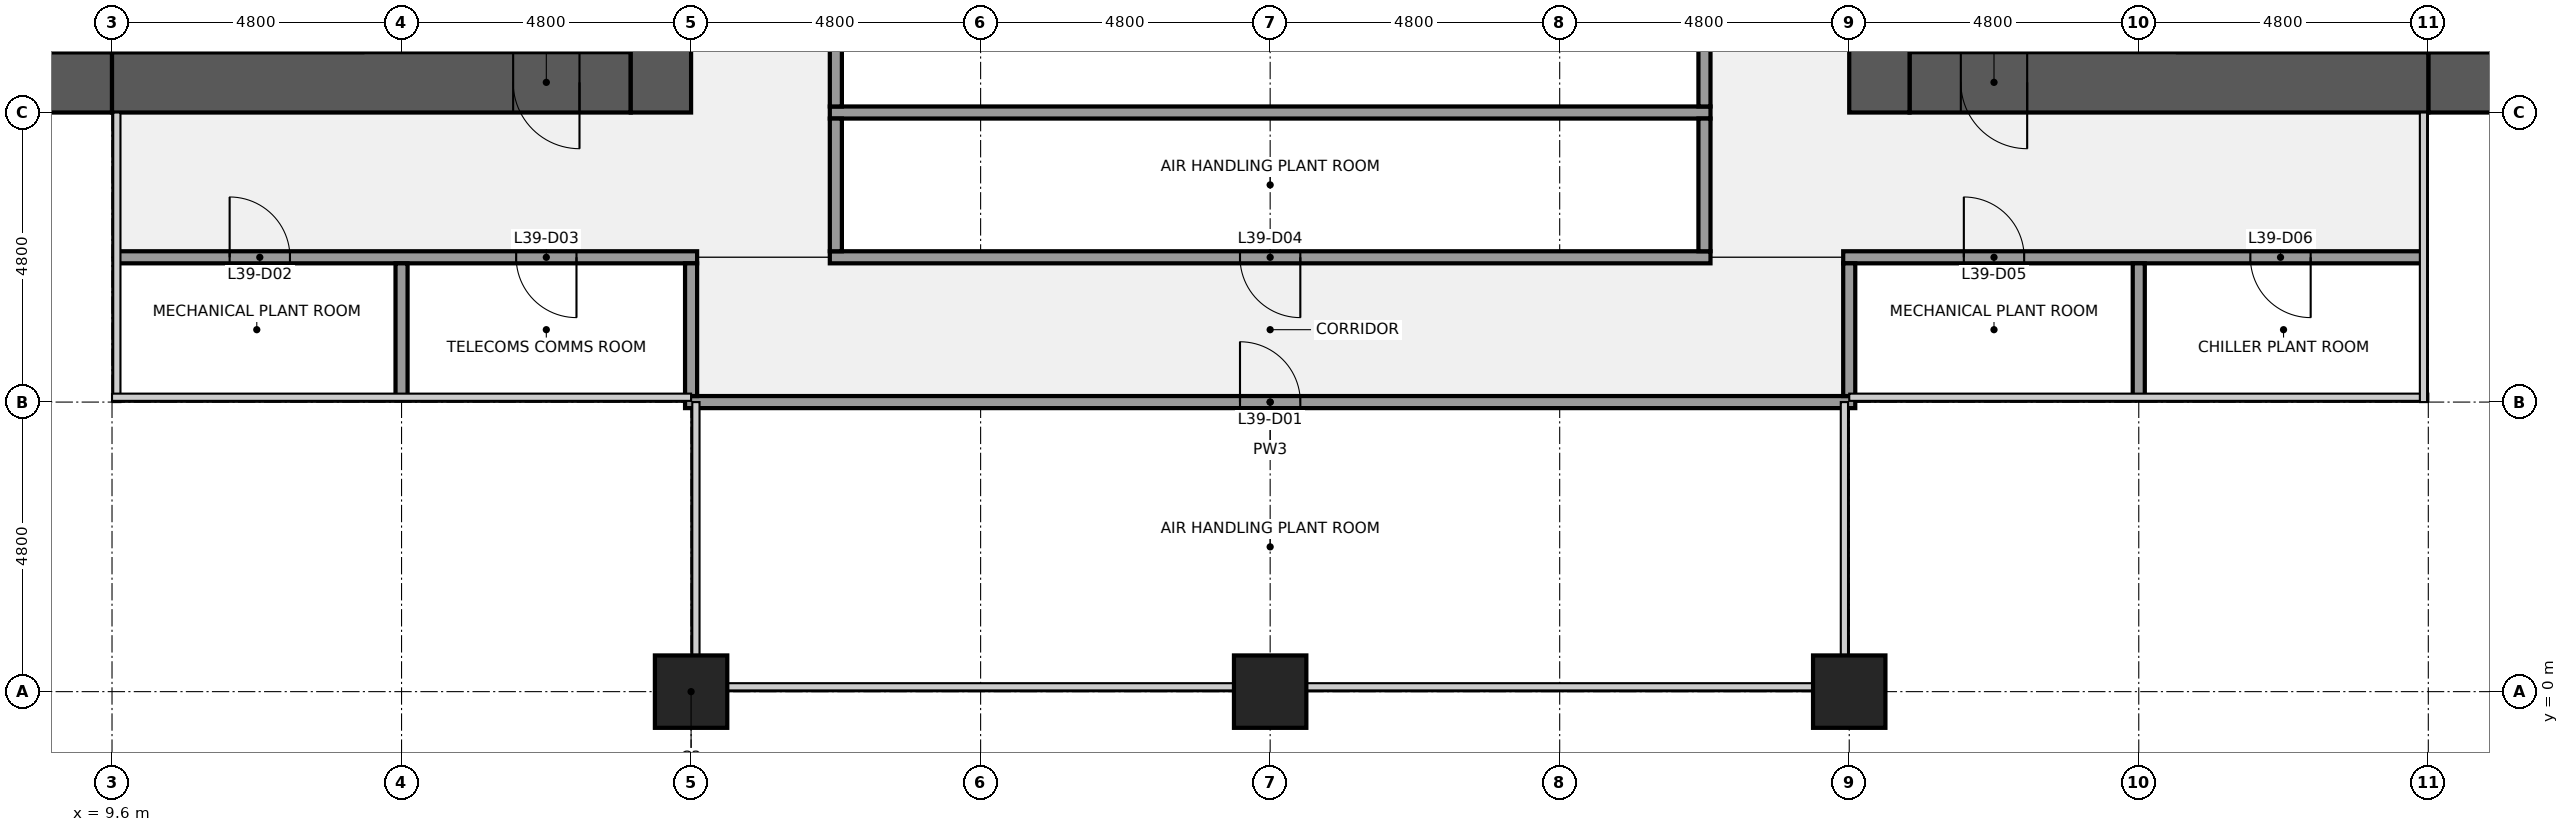
"""IFC4 building model, lengths in metres.
Left out: names, types, materials, properties, quantities, classifications, styles, units other than length and angle.
Written with IfcOpenShell. Run it as: python <this file> out.ifc"""

import sys

from ifc_helpers import new_model, si_unit, direction, frame, frame_2d, origin, origin_2d, place, context, subcontext, project, spatial, rectangle, extrude, element, fill, save


model = new_model("IFC4")
c1 = context("Model", 3, precision=1e-05, world=origin(), true_north=direction((0.0, 1.0)))
c2 = subcontext(c1, "Body", "Model", "MODEL_VIEW")
j1 = project(units=[si_unit("LENGTHUNIT", "METRE"), si_unit("PLANEANGLEUNIT", "RADIAN")], contexts=[c1])
p1 = place(None, origin())
s1 = spatial("IfcSite", under=j1, at=p1, CompositionType="ELEMENT")
p2 = place(p1, origin())
s2 = spatial("IfcBuilding", under=s1, at=p2, CompositionType="ELEMENT")
p3 = place(p2, frame((0.0, 0.0, 176.1)))
s3 = spatial("IfcBuildingStorey", under=s2, at=p3, CompositionType="ELEMENT", Elevation=176.1)
for number, where, z_axis, x_axis in (
    (1, (19.2, 0.0, 0.0), (0.0, 0.0, 1.0), (1.0, 0.0, 0.0)),
    (2, (28.8, 0.0, 0.0), (0.0, 0.0, 1.0), (1.0, 0.0, 0.0)),
    (3, (38.4, 0.0, 0.0), (0.0, 0.0, 1.0), (1.0, 0.0, 0.0)),
):
    element("IfcColumn", number, at=place(p3, frame(where, z_axis=z_axis, x_axis=x_axis)), inside=s3, PredefinedType="COLUMN", context=c2, shape_type="SweptSolid", body=[
        extrude(rectangle(XDim=1.2, YDim=1.2, at=origin_2d()), origin(), (0.0, 0.0, 1.0), 4.5),
    ])
p4 = place(p3, frame((9.6, 10.1, 0.0), z_axis=(0.0, 0.0, 1.0), x_axis=(-1.0, 0.0, 0.0)))
e4 = element("IfcWall", 4, at=p4, inside=s3, PredefinedType="SHEAR", context=c2, shape_type="SweptSolid", body=[
    extrude(rectangle(XDim=8.6, YDim=1.0, at=frame_2d((4.3, 0.0))), origin(), (0.0, 0.0, 1.0), 4.1),
])
p5 = place(p4, frame((1.5, 0.0, 0.9)))
e5 = element("IfcOpeningElement", 5, at=p5, cuts=e4, PredefinedType="OPENING", context=c2, shape_type="SweptSolid", body=[
    extrude(rectangle(XDim=1.8, YDim=1.5, at=frame_2d((0.9, 0.75))), frame((0.0, 0.51, 0.0), z_axis=(0.0, -1.0, 0.0), x_axis=(1.0, 0.0, 0.0)), (0.0, 0.0, 1.0), 1.02),
])
p6 = place(p3, frame((18.2, 10.1, 0.0), z_axis=(0.0, 0.0, 1.0), x_axis=(-1.0, 0.0, 0.0)))
e6 = element("IfcWall", 6, at=p6, inside=s3, PredefinedType="SHEAR", context=c2, shape_type="SweptSolid", body=[
    extrude(rectangle(XDim=8.6, YDim=1.0, at=frame_2d((4.3, 0.0))), origin(), (0.0, 0.0, 1.0), 4.1),
])
p7 = place(p6, frame((0.85, 0.0, 0.0)))
e7 = element("IfcOpeningElement", 7, at=p7, cuts=e6, PredefinedType="OPENING", context=c2, shape_type="SweptSolid", body=[
    extrude(rectangle(XDim=1.1, YDim=2.1, at=frame_2d((0.55, 1.05))), frame((0.0, 0.51, 0.0), z_axis=(0.0, -1.0, 0.0), x_axis=(1.0, 0.0, 0.0)), (0.0, 0.0, 1.0), 1.02),
])
p8 = place(p3, frame((18.7, 38.4, 0.0), z_axis=(0.0, 0.0, 1.0), x_axis=(0.0, -1.0, 0.0)))
e8 = element("IfcWall", 8, at=p8, inside=s3, PredefinedType="SHEAR", context=c2, shape_type="SweptSolid", body=[
    extrude(rectangle(XDim=28.8, YDim=1.0, at=frame_2d((14.4, 0.0))), origin(), (0.0, 0.0, 1.0), 4.1),
])
p9 = place(p8, frame((18.3, 0.0, 0.0)))
e9 = element("IfcOpeningElement", 9, at=p9, cuts=e8, PredefinedType="OPENING", context=c2, shape_type="SweptSolid", body=[
    extrude(rectangle(XDim=1.8, YDim=2.1, at=frame_2d((0.9, 1.05))), frame((0.0, 0.51, 0.0), z_axis=(0.0, -1.0, 0.0), x_axis=(1.0, 0.0, 0.0)), (0.0, 0.0, 1.0), 1.02),
])
p10 = place(p8, frame((8.7, 0.0, 0.0)))
e10 = element("IfcOpeningElement", 10, at=p10, cuts=e8, PredefinedType="OPENING", context=c2, shape_type="SweptSolid", body=[
    extrude(rectangle(XDim=1.8, YDim=2.1, at=frame_2d((0.9, 1.05))), frame((0.0, 0.51, 0.0), z_axis=(0.0, -1.0, 0.0), x_axis=(1.0, 0.0, 0.0)), (0.0, 0.0, 1.0), 1.02),
])
p11 = place(p3, frame((6.25, 10.7, 0.0), z_axis=(0.0, 0.0, 1.0), x_axis=(1.0, 0.0, 0.0)))
e11 = element("IfcWall", 11, at=p11, inside=s3, PredefinedType="SHEAR", context=c2, shape_type="SweptSolid", body=[
    extrude(rectangle(XDim=3.35, YDim=0.2, at=frame_2d((1.675, 0.0))), origin(), (0.0, 0.0, 1.0), 4.1),
])
p12 = place(p3, frame((9.6, 10.7, 0.0), z_axis=(0.0, 0.0, 1.0), x_axis=(1.0, 0.0, 0.0)))
e12 = element("IfcWall", 12, at=p12, inside=s3, PredefinedType="SHEAR", context=c2, shape_type="SweptSolid", body=[
    extrude(rectangle(XDim=4.15, YDim=0.2, at=frame_2d((2.075, 0.0))), origin(), (0.0, 0.0, 1.0), 4.1),
])
p13 = place(p3, frame((56.6, 10.1, 0.0), z_axis=(0.0, 0.0, 1.0), x_axis=(-1.0, 0.0, 0.0)))
e13 = element("IfcWall", 13, at=p13, inside=s3, PredefinedType="SHEAR", context=c2, shape_type="SweptSolid", body=[
    extrude(rectangle(XDim=8.6, YDim=1.0, at=frame_2d((4.3, 0.0))), origin(), (0.0, 0.0, 1.0), 4.1),
])
p14 = place(p13, frame((5.3, 0.0, 0.9)))
e14 = element("IfcOpeningElement", 14, at=p14, cuts=e13, PredefinedType="OPENING", context=c2, shape_type="SweptSolid", body=[
    extrude(rectangle(XDim=1.8, YDim=1.5, at=frame_2d((0.9, 0.75))), frame((0.0, 0.51, 0.0), z_axis=(0.0, -1.0, 0.0), x_axis=(1.0, 0.0, 0.0)), (0.0, 0.0, 1.0), 1.02),
])
p15 = place(p3, frame((48.0, 10.1, 0.0), z_axis=(0.0, 0.0, 1.0), x_axis=(-1.0, 0.0, 0.0)))
e15 = element("IfcWall", 15, at=p15, inside=s3, PredefinedType="SHEAR", context=c2, shape_type="SweptSolid", body=[
    extrude(rectangle(XDim=8.6, YDim=1.0, at=frame_2d((4.3, 0.0))), origin(), (0.0, 0.0, 1.0), 4.1),
])
p16 = place(p15, frame((6.65, 0.0, 0.0)))
e16 = element("IfcOpeningElement", 16, at=p16, cuts=e15, PredefinedType="OPENING", context=c2, shape_type="SweptSolid", body=[
    extrude(rectangle(XDim=1.1, YDim=2.1, at=frame_2d((0.55, 1.05))), frame((0.0, 0.51, 0.0), z_axis=(0.0, -1.0, 0.0), x_axis=(1.0, 0.0, 0.0)), (0.0, 0.0, 1.0), 1.02),
])
p17 = place(p3, frame((38.9, 9.6, 0.0), z_axis=(0.0, 0.0, 1.0), x_axis=(0.0, 1.0, 0.0)))
e17 = element("IfcWall", 17, at=p17, inside=s3, PredefinedType="SHEAR", context=c2, shape_type="SweptSolid", body=[
    extrude(rectangle(XDim=28.8, YDim=1.0, at=frame_2d((14.4, 0.0))), origin(), (0.0, 0.0, 1.0), 4.1),
])
p18 = place(p17, frame((8.7, 0.0, 0.0)))
e18 = element("IfcOpeningElement", 18, at=p18, cuts=e17, PredefinedType="OPENING", context=c2, shape_type="SweptSolid", body=[
    extrude(rectangle(XDim=1.8, YDim=2.1, at=frame_2d((0.9, 1.05))), frame((0.0, 0.51, 0.0), z_axis=(0.0, -1.0, 0.0), x_axis=(1.0, 0.0, 0.0)), (0.0, 0.0, 1.0), 1.02),
])
p19 = place(p17, frame((18.3, 0.0, 0.0)))
e19 = element("IfcOpeningElement", 19, at=p19, cuts=e17, PredefinedType="OPENING", context=c2, shape_type="SweptSolid", body=[
    extrude(rectangle(XDim=1.8, YDim=2.1, at=frame_2d((0.9, 1.05))), frame((0.0, 0.51, 0.0), z_axis=(0.0, -1.0, 0.0), x_axis=(1.0, 0.0, 0.0)), (0.0, 0.0, 1.0), 1.02),
])
p20 = place(p3, frame((48.0, 10.7, 0.0), z_axis=(0.0, 0.0, 1.0), x_axis=(1.0, 0.0, 0.0)))
e20 = element("IfcWall", 20, at=p20, inside=s3, PredefinedType="SHEAR", context=c2, shape_type="SweptSolid", body=[
    extrude(rectangle(XDim=3.35, YDim=0.2, at=frame_2d((1.675, 0.0))), origin(), (0.0, 0.0, 1.0), 4.1),
])
p21 = place(p3, frame((43.85, 10.7, 0.0), z_axis=(0.0, 0.0, 1.0), x_axis=(1.0, 0.0, 0.0)))
e21 = element("IfcWall", 21, at=p21, inside=s3, PredefinedType="SHEAR", context=c2, shape_type="SweptSolid", body=[
    extrude(rectangle(XDim=4.15, YDim=0.2, at=frame_2d((2.075, 0.0))), origin(), (0.0, 0.0, 1.0), 4.1),
])
p22 = place(p3, frame((19.1, 4.8, 0.0), z_axis=(0.0, 0.0, 1.0), x_axis=(1.0, 0.0, 0.0)))
e22 = element("IfcWall", 22, at=p22, inside=s3, PredefinedType="PARTITIONING", context=c2, shape_type="SweptSolid", body=[
    extrude(rectangle(XDim=19.4, YDim=0.2, at=frame_2d((9.7, 0.0))), origin(), (0.0, 0.0, 1.0), 2.992),
])
p23 = place(p22, frame((9.2, 0.0, 0.0)))
e23 = element("IfcOpeningElement", 23, at=p23, cuts=e22, PredefinedType="OPENING", context=c2, shape_type="SweptSolid", body=[
    extrude(rectangle(XDim=1.0, YDim=2.1, at=frame_2d((0.5, 1.05))), frame((0.0, 0.11, 0.0), z_axis=(0.0, -1.0, 0.0), x_axis=(1.0, 0.0, 0.0)), (0.0, 0.0, 1.0), 0.22),
])
p24 = place(p3, frame((9.7, 7.2, 0.0), z_axis=(0.0, 0.0, 1.0), x_axis=(1.0, 0.0, 0.0)))
e24 = element("IfcWall", 24, at=p24, inside=s3, PredefinedType="PARTITIONING", context=c2, shape_type="SweptSolid", body=[
    extrude(rectangle(XDim=9.6, YDim=0.2, at=frame_2d((4.8, 0.0))), origin(), (0.0, 0.0, 1.0), 2.992),
])
p25 = place(p24, frame((1.85, 0.0, 0.0)))
e25 = element("IfcOpeningElement", 25, at=p25, cuts=e24, PredefinedType="OPENING", context=c2, shape_type="SweptSolid", body=[
    extrude(rectangle(XDim=1.0, YDim=2.1, at=frame_2d((0.5, 1.05))), frame((0.0, 0.11, 0.0), z_axis=(0.0, -1.0, 0.0), x_axis=(1.0, 0.0, 0.0)), (0.0, 0.0, 1.0), 0.22),
])
p26 = place(p24, frame((6.6, 0.0, 0.0)))
e26 = element("IfcOpeningElement", 26, at=p26, cuts=e24, PredefinedType="OPENING", context=c2, shape_type="SweptSolid", body=[
    extrude(rectangle(XDim=1.0, YDim=2.1, at=frame_2d((0.5, 1.05))), frame((0.0, 0.11, 0.0), z_axis=(0.0, -1.0, 0.0), x_axis=(1.0, 0.0, 0.0)), (0.0, 0.0, 1.0), 0.22),
])
p27 = place(p3, frame((21.5, 7.2, 0.0), z_axis=(0.0, 0.0, 1.0), x_axis=(1.0, 0.0, 0.0)))
e27 = element("IfcWall", 27, at=p27, inside=s3, PredefinedType="PARTITIONING", context=c2, shape_type="SweptSolid", body=[
    extrude(rectangle(XDim=14.6, YDim=0.2, at=frame_2d((7.3, 0.0))), origin(), (0.0, 0.0, 1.0), 2.992),
])
p28 = place(p27, frame((6.8, 0.0, 0.0)))
e28 = element("IfcOpeningElement", 28, at=p28, cuts=e27, PredefinedType="OPENING", context=c2, shape_type="SweptSolid", body=[
    extrude(rectangle(XDim=1.0, YDim=2.1, at=frame_2d((0.5, 1.05))), frame((0.0, 0.11, 0.0), z_axis=(0.0, -1.0, 0.0), x_axis=(1.0, 0.0, 0.0)), (0.0, 0.0, 1.0), 0.22),
])
p29 = place(p3, frame((38.3, 7.2, 0.0), z_axis=(0.0, 0.0, 1.0), x_axis=(1.0, 0.0, 0.0)))
e29 = element("IfcWall", 29, at=p29, inside=s3, PredefinedType="PARTITIONING", context=c2, shape_type="SweptSolid", body=[
    extrude(rectangle(XDim=9.6, YDim=0.2, at=frame_2d((4.8, 0.0))), origin(), (0.0, 0.0, 1.0), 2.992),
])
p30 = place(p29, frame((2.0, 0.0, 0.0)))
e30 = element("IfcOpeningElement", 30, at=p30, cuts=e29, PredefinedType="OPENING", context=c2, shape_type="SweptSolid", body=[
    extrude(rectangle(XDim=1.0, YDim=2.1, at=frame_2d((0.5, 1.05))), frame((0.0, 0.11, 0.0), z_axis=(0.0, -1.0, 0.0), x_axis=(1.0, 0.0, 0.0)), (0.0, 0.0, 1.0), 0.22),
])
p31 = place(p29, frame((6.75, 0.0, 0.0)))
e31 = element("IfcOpeningElement", 31, at=p31, cuts=e29, PredefinedType="OPENING", context=c2, shape_type="SweptSolid", body=[
    extrude(rectangle(XDim=1.0, YDim=2.1, at=frame_2d((0.5, 1.05))), frame((0.0, 0.11, 0.0), z_axis=(0.0, -1.0, 0.0), x_axis=(1.0, 0.0, 0.0)), (0.0, 0.0, 1.0), 0.22),
])
p32 = place(p3, frame((21.5, 9.6, 0.0), z_axis=(0.0, 0.0, 1.0), x_axis=(1.0, 0.0, 0.0)))
e32 = element("IfcWall", 32, at=p32, inside=s3, PredefinedType="PARTITIONING", context=c2, shape_type="SweptSolid", body=[
    extrude(rectangle(XDim=14.6, YDim=0.2, at=frame_2d((7.3, 0.0))), origin(), (0.0, 0.0, 1.0), 2.992),
])
for number, where, z_axis, x_axis in (
    (33, (14.4, 4.9, 0.0), (0.0, 0.0, 1.0), (0.0, 1.0, 0.0)),
    (34, (19.2, 4.9, 0.0), (0.0, 0.0, 1.0), (0.0, 1.0, 0.0)),
):
    element("IfcWall", number, at=place(p3, frame(where, z_axis=z_axis, x_axis=x_axis)), inside=s3, PredefinedType="PARTITIONING", context=c2, shape_type="SweptSolid", body=[
        extrude(rectangle(XDim=2.2, YDim=0.2, at=frame_2d((1.1, 0.0))), origin(), (0.0, 0.0, 1.0), 2.992),
    ])
p33 = place(p3, frame((21.6, 7.3, 0.0), z_axis=(0.0, 0.0, 1.0), x_axis=(0.0, 1.0, 0.0)))
e35 = element("IfcWall", 35, at=p33, inside=s3, PredefinedType="PARTITIONING", context=c2, shape_type="SweptSolid", body=[
    extrude(rectangle(XDim=2.2, YDim=0.2, at=frame_2d((1.1, 0.0))), origin(), (0.0, 0.0, 1.0), 2.992),
])
p34 = place(p3, frame((21.6, 9.7, 0.0), z_axis=(0.0, 0.0, 1.0), x_axis=(0.0, 1.0, 0.0)))
e36 = element("IfcWall", 36, at=p34, inside=s3, PredefinedType="PARTITIONING", context=c2, shape_type="SweptSolid", body=[
    extrude(rectangle(XDim=9.4, YDim=0.2, at=frame_2d((4.7, 0.0))), origin(), (0.0, 0.0, 1.0), 2.992),
])
p35 = place(p34, frame((4.2, 0.0, 0.0)))
e37 = element("IfcOpeningElement", 37, at=p35, cuts=e36, PredefinedType="OPENING", context=c2, shape_type="SweptSolid", body=[
    extrude(rectangle(XDim=1.0, YDim=2.1, at=frame_2d((0.5, 1.05))), frame((0.0, 0.11, 0.0), z_axis=(0.0, -1.0, 0.0), x_axis=(1.0, 0.0, 0.0)), (0.0, 0.0, 1.0), 0.22),
])
p36 = place(p3, frame((36.0, 7.3, 0.0), z_axis=(0.0, 0.0, 1.0), x_axis=(0.0, 1.0, 0.0)))
e38 = element("IfcWall", 38, at=p36, inside=s3, PredefinedType="PARTITIONING", context=c2, shape_type="SweptSolid", body=[
    extrude(rectangle(XDim=2.2, YDim=0.2, at=frame_2d((1.1, 0.0))), origin(), (0.0, 0.0, 1.0), 2.992),
])
p37 = place(p3, frame((36.0, 9.7, 0.0), z_axis=(0.0, 0.0, 1.0), x_axis=(0.0, 1.0, 0.0)))
e39 = element("IfcWall", 39, at=p37, inside=s3, PredefinedType="PARTITIONING", context=c2, shape_type="SweptSolid", body=[
    extrude(rectangle(XDim=9.4, YDim=0.2, at=frame_2d((4.7, 0.0))), origin(), (0.0, 0.0, 1.0), 2.992),
])
for number, where, z_axis, x_axis in (
    (40, (38.4, 4.9, 0.0), (0.0, 0.0, 1.0), (0.0, 1.0, 0.0)),
    (41, (43.2, 4.9, 0.0), (0.0, 0.0, 1.0), (0.0, 1.0, 0.0)),
):
    element("IfcWall", number, at=place(p3, frame(where, z_axis=z_axis, x_axis=x_axis)), inside=s3, PredefinedType="PARTITIONING", context=c2, shape_type="SweptSolid", body=[
        extrude(rectangle(XDim=2.2, YDim=0.2, at=frame_2d((1.1, 0.0))), origin(), (0.0, 0.0, 1.0), 2.992),
    ])
for number, where, z_axis, x_axis in (
    (42, (19.2, -1.05, 0.0), (0.0, 0.0, 1.0), (1.0, 0.0, 0.0)),
    (43, (38.4, -1.05, 0.0), (0.0, 0.0, 1.0), (1.0, 0.0, 0.0)),
):
    element("IfcColumn", number, at=place(p3, frame(where, z_axis=z_axis, x_axis=x_axis)), inside=s3, PredefinedType="PILASTER", context=c2, shape_type="SweptSolid", body=[
        extrude(rectangle(XDim=3.6, YDim=0.9, at=origin_2d()), origin(), (0.0, 0.0, 1.0), 4.5),
    ])
p38 = place(p7, origin())
e44 = element("IfcDoor", 44, at=p38, inside=s3, OperationType="SINGLE_SWING_LEFT", PredefinedType="DOOR", context=c2, shape_type="SweptSolid", body=[
    extrude(rectangle(XDim=1.1, YDim=2.1, at=frame_2d((0.55, 1.05))), frame((0.0, 0.025, 0.0), z_axis=(0.0, -1.0, 0.0), x_axis=(1.0, 0.0, 0.0)), (0.0, 0.0, 1.0), 0.05),
])
fill(e7, e44)
p39 = place(p16, origin())
e45 = element("IfcDoor", 45, at=p39, inside=s3, OperationType="SINGLE_SWING_LEFT", PredefinedType="DOOR", context=c2, shape_type="SweptSolid", body=[
    extrude(rectangle(XDim=1.1, YDim=2.1, at=frame_2d((0.55, 1.05))), frame((0.0, 0.025, 0.0), z_axis=(0.0, -1.0, 0.0), x_axis=(1.0, 0.0, 0.0)), (0.0, 0.0, 1.0), 0.05),
])
fill(e16, e45)
p40 = place(p23, origin())
e46 = element("IfcDoor", 46, at=p40, inside=s3, OperationType="SINGLE_SWING_LEFT", PredefinedType="DOOR", context=c2, shape_type="SweptSolid", body=[
    extrude(rectangle(XDim=1.0, YDim=2.1, at=frame_2d((0.5, 1.05))), frame((0.0, 0.025, 0.0), z_axis=(0.0, -1.0, 0.0), x_axis=(1.0, 0.0, 0.0)), (0.0, 0.0, 1.0), 0.05),
])
fill(e23, e46)
p41 = place(p25, origin())
e47 = element("IfcDoor", 47, at=p41, inside=s3, OperationType="SINGLE_SWING_LEFT", PredefinedType="DOOR", context=c2, shape_type="SweptSolid", body=[
    extrude(rectangle(XDim=1.0, YDim=2.1, at=frame_2d((0.5, 1.05))), frame((0.0, 0.025, 0.0), z_axis=(0.0, -1.0, 0.0), x_axis=(1.0, 0.0, 0.0)), (0.0, 0.0, 1.0), 0.05),
])
fill(e25, e47)
p42 = place(p26, origin())
e48 = element("IfcDoor", 48, at=p42, inside=s3, OperationType="SINGLE_SWING_RIGHT", PredefinedType="DOOR", context=c2, shape_type="SweptSolid", body=[
    extrude(rectangle(XDim=1.0, YDim=2.1, at=frame_2d((0.5, 1.05))), frame((0.0, 0.025, 0.0), z_axis=(0.0, -1.0, 0.0), x_axis=(1.0, 0.0, 0.0)), (0.0, 0.0, 1.0), 0.05),
])
fill(e26, e48)
p43 = place(p28, origin())
e49 = element("IfcDoor", 49, at=p43, inside=s3, OperationType="SINGLE_SWING_RIGHT", PredefinedType="DOOR", context=c2, shape_type="SweptSolid", body=[
    extrude(rectangle(XDim=1.0, YDim=2.1, at=frame_2d((0.5, 1.05))), frame((0.0, 0.025, 0.0), z_axis=(0.0, -1.0, 0.0), x_axis=(1.0, 0.0, 0.0)), (0.0, 0.0, 1.0), 0.05),
])
fill(e28, e49)
p44 = place(p30, origin())
e50 = element("IfcDoor", 50, at=p44, inside=s3, OperationType="SINGLE_SWING_LEFT", PredefinedType="DOOR", context=c2, shape_type="SweptSolid", body=[
    extrude(rectangle(XDim=1.0, YDim=2.1, at=frame_2d((0.5, 1.05))), frame((0.0, 0.025, 0.0), z_axis=(0.0, -1.0, 0.0), x_axis=(1.0, 0.0, 0.0)), (0.0, 0.0, 1.0), 0.05),
])
fill(e30, e50)
p45 = place(p31, origin())
e51 = element("IfcDoor", 51, at=p45, inside=s3, OperationType="SINGLE_SWING_RIGHT", PredefinedType="DOOR", context=c2, shape_type="SweptSolid", body=[
    extrude(rectangle(XDim=1.0, YDim=2.1, at=frame_2d((0.5, 1.05))), frame((0.0, 0.025, 0.0), z_axis=(0.0, -1.0, 0.0), x_axis=(1.0, 0.0, 0.0)), (0.0, 0.0, 1.0), 0.05),
])
fill(e31, e51)
save(model, sys.argv[1])
